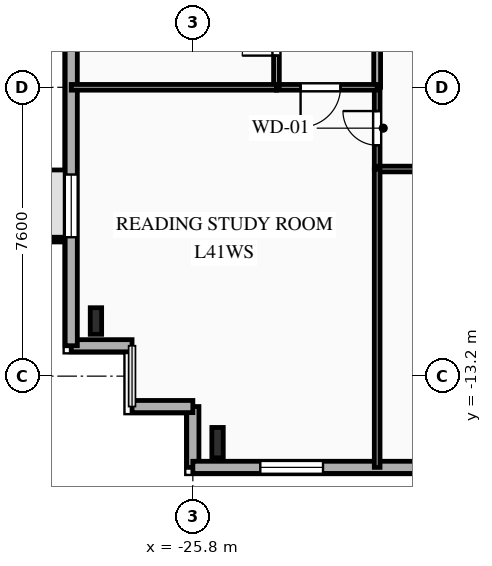
"""IFC4 building model, lengths in metres.
Left out: names, types, materials, properties, quantities, classifications, styles, units other than length and angle.
Written with IfcOpenShell. Run it as: python <this file> out.ifc"""

import sys

from ifc_helpers import new_model, si_unit, direction, frame, frame_2d, origin, origin_2d, place, context, subcontext, project, spatial, rectangle, i_section, extrude, element, fill, save


model = new_model("IFC4")
c1 = context("Model", 3, precision=1e-05, world=origin(), true_north=direction((0.0, 1.0)))
c2 = subcontext(c1, "Body", "Model", "MODEL_VIEW")
j1 = project(units=[si_unit("LENGTHUNIT", "METRE"), si_unit("PLANEANGLEUNIT", "RADIAN")], contexts=[c1])
p1 = place(None, origin())
s1 = spatial("IfcSite", under=j1, at=p1, CompositionType="ELEMENT")
p2 = place(p1, origin())
s2 = spatial("IfcBuilding", under=s1, at=p2, CompositionType="ELEMENT")
p3 = place(p2, frame((0.0, 0.0, 147.75)))
s3 = spatial("IfcBuildingStorey", under=s2, at=p3, CompositionType="ELEMENT", Elevation=147.75)
p4 = place(p3, frame((-25.15, -14.95, 0.0), z_axis=(0.0, 0.0, 1.0), x_axis=(1.0, 0.0, 0.0)))
e1 = element("IfcColumn", 1, at=p4, inside=s3, PredefinedType="COLUMN", context=c2, shape_type="SweptSolid", body=[
    extrude(i_section(OverallWidth=0.3, OverallDepth=0.8, WebThickness=0.018, FlangeThickness=0.033, FilletRadius=0.03, at=origin_2d()), origin(), (0.0, 0.0, 1.0), 3.35),
])
p5 = place(p3, frame((-28.35, -11.75, 0.0), z_axis=(0.0, 0.0, 1.0), x_axis=(1.0, 0.0, 0.0)))
e2 = element("IfcColumn", 2, at=p5, inside=s3, PredefinedType="COLUMN", context=c2, shape_type="SweptSolid", body=[
    extrude(i_section(OverallWidth=0.3, OverallDepth=0.7, WebThickness=0.017, FlangeThickness=0.032, FilletRadius=0.027, at=origin_2d()), origin(), (0.0, 0.0, 1.0), 3.35),
])
p6 = place(p3, frame((-25.8, -15.6, 0.0), z_axis=(0.0, 0.0, 1.0), x_axis=(0.0, 1.0, 0.0)))
e3 = element("IfcWall", 3, at=p6, inside=s3, PredefinedType="SOLIDWALL", context=c2, shape_type="SweptSolid", body=[
    extrude(rectangle(XDim=1.6, YDim=0.32, at=frame_2d((0.8, 0.0))), origin(), (0.0, 0.0, 1.0), 3.04),
])
p7 = place(p3, frame((-25.8, -14.0, 0.0), z_axis=(0.0, 0.0, 1.0), x_axis=(-1.0, 0.0, 0.0)))
e4 = element("IfcWall", 4, at=p7, inside=s3, PredefinedType="SOLIDWALL", context=c2, shape_type="SweptSolid", body=[
    extrude(rectangle(XDim=1.6, YDim=0.32, at=frame_2d((0.8, 0.0))), origin(), (0.0, 0.0, 1.0), 3.04),
])
p8 = place(p3, frame((-27.4, -12.4, 0.0), z_axis=(0.0, 0.0, 1.0), x_axis=(-1.0, 0.0, 0.0)))
e5 = element("IfcWall", 5, at=p8, inside=s3, PredefinedType="SOLIDWALL", context=c2, shape_type="SweptSolid", body=[
    extrude(rectangle(XDim=1.6, YDim=0.32, at=frame_2d((0.8, 0.0))), origin(), (0.0, 0.0, 1.0), 3.04),
])
p9 = place(p3, frame((-29.0, -12.4, 0.0), z_axis=(0.0, 0.0, 1.0), x_axis=(0.0, 1.0, 0.0)))
e6 = element("IfcWall", 6, at=p9, inside=s3, PredefinedType="SOLIDWALL", context=c2, shape_type="SweptSolid", body=[
    extrude(rectangle(XDim=29.6, YDim=0.32, at=frame_2d((14.8, 0.0))), origin(), (0.0, 0.0, 1.0), 3.04),
])
p10 = place(p9, frame((2.855, 0.0, 0.85)))
e7 = element("IfcOpeningElement", 7, at=p10, cuts=e6, PredefinedType="OPENING", context=c2, shape_type="SweptSolid", body=[
    extrude(rectangle(XDim=1.65, YDim=1.85, at=frame_2d((0.825, 0.925))), frame((0.0, 0.17, 0.0), z_axis=(0.0, -1.0, 0.0), x_axis=(1.0, 0.0, 0.0)), (0.0, 0.0, 1.0), 0.34),
])
p11 = place(p9, frame((9.865, 0.0, 0.85)))
e8 = element("IfcOpeningElement", 8, at=p11, cuts=e6, PredefinedType="OPENING", context=c2, shape_type="SweptSolid", body=[
    extrude(rectangle(XDim=1.95, YDim=1.85, at=frame_2d((0.975, 0.925))), frame((0.0, 0.17, 0.0), z_axis=(0.0, -1.0, 0.0), x_axis=(1.0, 0.0, 0.0)), (0.0, 0.0, 1.0), 0.34),
])
p12 = place(p9, frame((13.08, 0.0, 0.85)))
e9 = element("IfcOpeningElement", 9, at=p12, cuts=e6, PredefinedType="OPENING", context=c2, shape_type="SweptSolid", body=[
    extrude(rectangle(XDim=1.6, YDim=1.85, at=frame_2d((0.8, 0.925))), frame((0.0, 0.17, 0.0), z_axis=(0.0, -1.0, 0.0), x_axis=(1.0, 0.0, 0.0)), (0.0, 0.0, 1.0), 0.34),
])
p13 = place(p9, frame((15.88, 0.0, 0.85)))
e10 = element("IfcOpeningElement", 10, at=p13, cuts=e6, PredefinedType="OPENING", context=c2, shape_type="SweptSolid", body=[
    extrude(rectangle(XDim=1.6, YDim=1.85, at=frame_2d((0.8, 0.925))), frame((0.0, 0.17, 0.0), z_axis=(0.0, -1.0, 0.0), x_axis=(1.0, 0.0, 0.0)), (0.0, 0.0, 1.0), 0.34),
])
p14 = place(p9, frame((18.72, 0.0, 0.85)))
e11 = element("IfcOpeningElement", 11, at=p14, cuts=e6, PredefinedType="OPENING", context=c2, shape_type="SweptSolid", body=[
    extrude(rectangle(XDim=1.6, YDim=1.85, at=frame_2d((0.8, 0.925))), frame((0.0, 0.17, 0.0), z_axis=(0.0, -1.0, 0.0), x_axis=(1.0, 0.0, 0.0)), (0.0, 0.0, 1.0), 0.34),
])
p15 = place(p9, frame((24.255, 0.0, 0.85)))
e12 = element("IfcOpeningElement", 12, at=p15, cuts=e6, PredefinedType="OPENING", context=c2, shape_type="SweptSolid", body=[
    extrude(rectangle(XDim=1.65, YDim=1.85, at=frame_2d((0.825, 0.925))), frame((0.0, 0.17, 0.0), z_axis=(0.0, -1.0, 0.0), x_axis=(1.0, 0.0, 0.0)), (0.0, 0.0, 1.0), 0.34),
])
p16 = place(p3, frame((23.8, -15.6, 0.0), z_axis=(0.0, 0.0, 1.0), x_axis=(-1.0, 0.0, 0.0)))
e13 = element("IfcWall", 13, at=p16, inside=s3, PredefinedType="SOLIDWALL", context=c2, shape_type="SweptSolid", body=[
    extrude(rectangle(XDim=49.6, YDim=0.32, at=frame_2d((24.8, 0.0))), origin(), (0.0, 0.0, 1.0), 3.04),
])
p17 = place(p16, frame((1.13, 0.0, 0.85)))
e14 = element("IfcOpeningElement", 14, at=p17, cuts=e13, PredefinedType="OPENING", context=c2, shape_type="SweptSolid", body=[
    extrude(rectangle(XDim=1.1, YDim=1.85, at=frame_2d((0.55, 0.925))), frame((0.0, 0.17, 0.0), z_axis=(0.0, -1.0, 0.0), x_axis=(1.0, 0.0, 0.0)), (0.0, 0.0, 1.0), 0.34),
])
p18 = place(p16, frame((5.055, 0.0, 0.85)))
e15 = element("IfcOpeningElement", 15, at=p18, cuts=e13, PredefinedType="OPENING", context=c2, shape_type="SweptSolid", body=[
    extrude(rectangle(XDim=1.65, YDim=1.85, at=frame_2d((0.825, 0.925))), frame((0.0, 0.17, 0.0), z_axis=(0.0, -1.0, 0.0), x_axis=(1.0, 0.0, 0.0)), (0.0, 0.0, 1.0), 0.34),
])
p19 = place(p16, frame((10.78, 0.0, 0.85)))
e16 = element("IfcOpeningElement", 16, at=p19, cuts=e13, PredefinedType="OPENING", context=c2, shape_type="SweptSolid", body=[
    extrude(rectangle(XDim=2.2, YDim=1.85, at=frame_2d((1.1, 0.925))), frame((0.0, 0.17, 0.0), z_axis=(0.0, -1.0, 0.0), x_axis=(1.0, 0.0, 0.0)), (0.0, 0.0, 1.0), 0.34),
])
p20 = place(p16, frame((17.284, 0.0, 0.85)))
e17 = element("IfcOpeningElement", 17, at=p20, cuts=e13, PredefinedType="OPENING", context=c2, shape_type="SweptSolid", body=[
    extrude(rectangle(XDim=2.2, YDim=1.85, at=frame_2d((1.1, 0.925))), frame((0.0, 0.17, 0.0), z_axis=(0.0, -1.0, 0.0), x_axis=(1.0, 0.0, 0.0)), (0.0, 0.0, 1.0), 0.34),
])
p21 = place(p16, frame((22.248, 0.0, 0.85)))
e18 = element("IfcOpeningElement", 18, at=p21, cuts=e13, PredefinedType="OPENING", context=c2, shape_type="SweptSolid", body=[
    extrude(rectangle(XDim=2.2, YDim=1.85, at=frame_2d((1.1, 0.925))), frame((0.0, 0.17, 0.0), z_axis=(0.0, -1.0, 0.0), x_axis=(1.0, 0.0, 0.0)), (0.0, 0.0, 1.0), 0.34),
])
p22 = place(p16, frame((28.7, 0.0, 0.85)))
e19 = element("IfcOpeningElement", 19, at=p22, cuts=e13, PredefinedType="OPENING", context=c2, shape_type="SweptSolid", body=[
    extrude(rectangle(XDim=2.2, YDim=1.85, at=frame_2d((1.1, 0.925))), frame((0.0, 0.17, 0.0), z_axis=(0.0, -1.0, 0.0), x_axis=(1.0, 0.0, 0.0)), (0.0, 0.0, 1.0), 0.34),
])
p23 = place(p16, frame((34.7, 0.0, 0.85)))
e20 = element("IfcOpeningElement", 20, at=p23, cuts=e13, PredefinedType="OPENING", context=c2, shape_type="SweptSolid", body=[
    extrude(rectangle(XDim=2.2, YDim=1.85, at=frame_2d((1.1, 0.925))), frame((0.0, 0.17, 0.0), z_axis=(0.0, -1.0, 0.0), x_axis=(1.0, 0.0, 0.0)), (0.0, 0.0, 1.0), 0.34),
])
p24 = place(p16, frame((41.492, 0.0, 0.85)))
e21 = element("IfcOpeningElement", 21, at=p24, cuts=e13, PredefinedType="OPENING", context=c2, shape_type="SweptSolid", body=[
    extrude(rectangle(XDim=1.65, YDim=1.85, at=frame_2d((0.825, 0.925))), frame((0.0, 0.17, 0.0), z_axis=(0.0, -1.0, 0.0), x_axis=(1.0, 0.0, 0.0)), (0.0, 0.0, 1.0), 0.34),
])
p25 = place(p16, frame((46.175, 0.0, 0.85)))
e22 = element("IfcOpeningElement", 22, at=p25, cuts=e13, PredefinedType="OPENING", context=c2, shape_type="SweptSolid", body=[
    extrude(rectangle(XDim=1.65, YDim=1.85, at=frame_2d((0.825, 0.925))), frame((0.0, 0.17, 0.0), z_axis=(0.0, -1.0, 0.0), x_axis=(1.0, 0.0, 0.0)), (0.0, 0.0, 1.0), 0.34),
])
p26 = place(p3, frame((-20.95, -7.75, 0.0), z_axis=(0.0, 0.0, 1.0), x_axis=(0.0, 1.0, 0.0)))
e23 = element("IfcWall", 23, at=p26, inside=s3, PredefinedType="PARTITIONING", context=c2, shape_type="SweptSolid", body=[
    extrude(rectangle(XDim=2.15, YDim=0.15, at=frame_2d((1.075, 0.0))), origin(), (0.0, 0.0, 1.0), 3.04),
])
p27 = place(p26, frame((0.625, 0.0, 0.0)))
e24 = element("IfcOpeningElement", 24, at=p27, cuts=e23, PredefinedType="OPENING", context=c2, shape_type="SweptSolid", body=[
    extrude(rectangle(XDim=0.9, YDim=2.1, at=frame_2d((0.45, 1.05))), frame((0.0, 0.085, 0.0), z_axis=(0.0, -1.0, 0.0), x_axis=(1.0, 0.0, 0.0)), (0.0, 0.0, 1.0), 0.17),
])
p28 = place(p3, frame((-14.964, -7.75, 0.0), z_axis=(0.0, 0.0, 1.0), x_axis=(-1.0, 0.0, 0.0)))
e25 = element("IfcWall", 25, at=p28, inside=s3, PredefinedType="PARTITIONING", context=c2, shape_type="SweptSolid", body=[
    extrude(rectangle(XDim=5.986, YDim=0.15, at=frame_2d((2.993, 0.0))), origin(), (0.0, 0.0, 1.0), 3.04),
])
p29 = place(p28, frame((1.052, 0.0, 0.0)))
e26 = element("IfcOpeningElement", 26, at=p29, cuts=e25, PredefinedType="OPENING", context=c2, shape_type="SweptSolid", body=[
    extrude(rectangle(XDim=1.05, YDim=2.15, at=frame_2d((0.525, 1.075))), frame((0.0, 0.085, 0.0), z_axis=(0.0, -1.0, 0.0), x_axis=(1.0, 0.0, 0.0)), (0.0, 0.0, 1.0), 0.17),
])
p30 = place(p3, frame((-20.95, -5.6, 0.0), z_axis=(0.0, 0.0, 1.0), x_axis=(0.0, 1.0, 0.0)))
e27 = element("IfcWall", 27, at=p30, inside=s3, PredefinedType="PARTITIONING", context=c2, shape_type="SweptSolid", body=[
    extrude(rectangle(XDim=14.1, YDim=0.18, at=frame_2d((7.05, 0.0))), origin(), (0.0, 0.0, 1.0), 3.04),
])
p31 = place(p30, frame((5.058, 0.0, 0.0)))
e28 = element("IfcOpeningElement", 28, at=p31, cuts=e27, PredefinedType="OPENING", context=c2, shape_type="SweptSolid", body=[
    extrude(rectangle(XDim=1.0, YDim=2.15, at=frame_2d((0.5, 1.075))), frame((0.0, 0.1, 0.0), z_axis=(0.0, -1.0, 0.0), x_axis=(1.0, 0.0, 0.0)), (0.0, 0.0, 1.0), 0.2),
])
p32 = place(p3, frame((-20.95, -5.6, 0.0), z_axis=(0.0, 0.0, 1.0), x_axis=(-1.0, 0.0, 0.0)))
e29 = element("IfcWall", 29, at=p32, inside=s3, PredefinedType="PARTITIONING", context=c2, shape_type="SweptSolid", body=[
    extrude(rectangle(XDim=2.65, YDim=0.15, at=frame_2d((1.325, 0.0))), origin(), (0.0, 0.0, 1.0), 3.04),
])
p33 = place(p32, frame((0.965, 0.0, 0.0)))
e30 = element("IfcOpeningElement", 30, at=p33, cuts=e29, PredefinedType="OPENING", context=c2, shape_type="SweptSolid", body=[
    extrude(rectangle(XDim=1.05, YDim=2.15, at=frame_2d((0.525, 1.075))), frame((0.0, 0.085, 0.0), z_axis=(0.0, -1.0, 0.0), x_axis=(1.0, 0.0, 0.0)), (0.0, 0.0, 1.0), 0.17),
])
p34 = place(p3, frame((-23.6, -5.6, 0.0), z_axis=(0.0, 0.0, 1.0), x_axis=(0.0, 1.0, 0.0)))
e31 = element("IfcWall", 31, at=p34, inside=s3, PredefinedType="PLUMBINGWALL", context=c2, shape_type="SweptSolid", body=[
    extrude(rectangle(XDim=2.35, YDim=0.15, at=frame_2d((1.175, 0.0))), origin(), (0.0, 0.0, 1.0), 2.695),
])
p35 = place(p34, frame((0.834, 0.0, 0.0)))
e32 = element("IfcOpeningElement", 32, at=p35, cuts=e31, PredefinedType="OPENING", context=c2, shape_type="SweptSolid", body=[
    extrude(rectangle(XDim=0.9, YDim=2.1, at=frame_2d((0.45, 1.05))), frame((0.0, 0.085, 0.0), z_axis=(0.0, -1.0, 0.0), x_axis=(1.0, 0.0, 0.0)), (0.0, 0.0, 1.0), 0.17),
])
p36 = place(p3, frame((-29.0, -5.6, 0.0), z_axis=(0.0, 0.0, 1.0), x_axis=(1.0, 0.0, 0.0)))
e33 = element("IfcWall", 33, at=p36, inside=s3, PredefinedType="PLUMBINGWALL", context=c2, shape_type="SweptSolid", body=[
    extrude(rectangle(XDim=5.4, YDim=0.15, at=frame_2d((2.7, 0.0))), origin(), (0.0, 0.0, 1.0), 3.04),
])
p37 = place(p3, frame((-20.95, -7.75, 0.0), z_axis=(0.0, 0.0, 1.0), x_axis=(0.0, -1.0, 0.0)))
e34 = element("IfcWall", 34, at=p37, inside=s3, PredefinedType="PARTITIONING", context=c2, shape_type="SweptSolid", body=[
    extrude(rectangle(XDim=7.85, YDim=0.15, at=frame_2d((3.925, 0.0))), origin(), (0.0, 0.0, 1.0), 3.04),
])
p38 = place(p10, origin())
e35 = element("IfcWindow", 35, at=p38, inside=s3, PartitioningType="SINGLE_PANEL", PredefinedType="WINDOW", context=c2, shape_type="SweptSolid", body=[
    extrude(rectangle(XDim=1.65, YDim=1.85, at=frame_2d((0.825, 0.925))), frame((0.0, 0.03, 0.0), z_axis=(0.0, -1.0, 0.0), x_axis=(1.0, 0.0, 0.0)), (0.0, 0.0, 1.0), 0.06),
])
fill(e7, e35)
p39 = place(p25, origin())
e36 = element("IfcWindow", 36, at=p39, inside=s3, PartitioningType="SINGLE_PANEL", PredefinedType="WINDOW", context=c2, shape_type="SweptSolid", body=[
    extrude(rectangle(XDim=1.65, YDim=1.85, at=frame_2d((0.825, 0.925))), frame((0.0, 0.03, 0.0), z_axis=(0.0, -1.0, 0.0), x_axis=(1.0, 0.0, 0.0)), (0.0, 0.0, 1.0), 0.06),
])
fill(e22, e36)
p40 = place(p27, origin())
e37 = element("IfcDoor", 37, at=p40, inside=s3, OperationType="SINGLE_SWING_RIGHT", PredefinedType="DOOR", context=c2, shape_type="SweptSolid", body=[
    extrude(rectangle(XDim=0.9, YDim=2.1, at=frame_2d((0.45, 1.05))), frame((0.0, 0.025, 0.0), z_axis=(0.0, -1.0, 0.0), x_axis=(1.0, 0.0, 0.0)), (0.0, 0.0, 1.0), 0.05),
])
fill(e24, e37)
p41 = place(p33, origin())
e38 = element("IfcDoor", 38, at=p41, inside=s3, OperationType="SINGLE_SWING_RIGHT", PredefinedType="DOOR", context=c2, shape_type="SweptSolid", body=[
    extrude(rectangle(XDim=1.05, YDim=2.15, at=frame_2d((0.525, 1.075))), frame((0.0, 0.025, 0.0), z_axis=(0.0, -1.0, 0.0), x_axis=(1.0, 0.0, 0.0)), (0.0, 0.0, 1.0), 0.05),
])
fill(e30, e38)
p42 = place(p35, origin())
e39 = element("IfcDoor", 39, at=p42, inside=s3, OperationType="SINGLE_SWING_LEFT", PredefinedType="DOOR", context=c2, shape_type="SweptSolid", body=[
    extrude(rectangle(XDim=0.9, YDim=2.1, at=frame_2d((0.45, 1.05))), frame((0.0, 0.025, 0.0), z_axis=(0.0, -1.0, 0.0), x_axis=(1.0, 0.0, 0.0)), (0.0, 0.0, 1.0), 0.05),
])
fill(e32, e39)
save(model, sys.argv[1])
